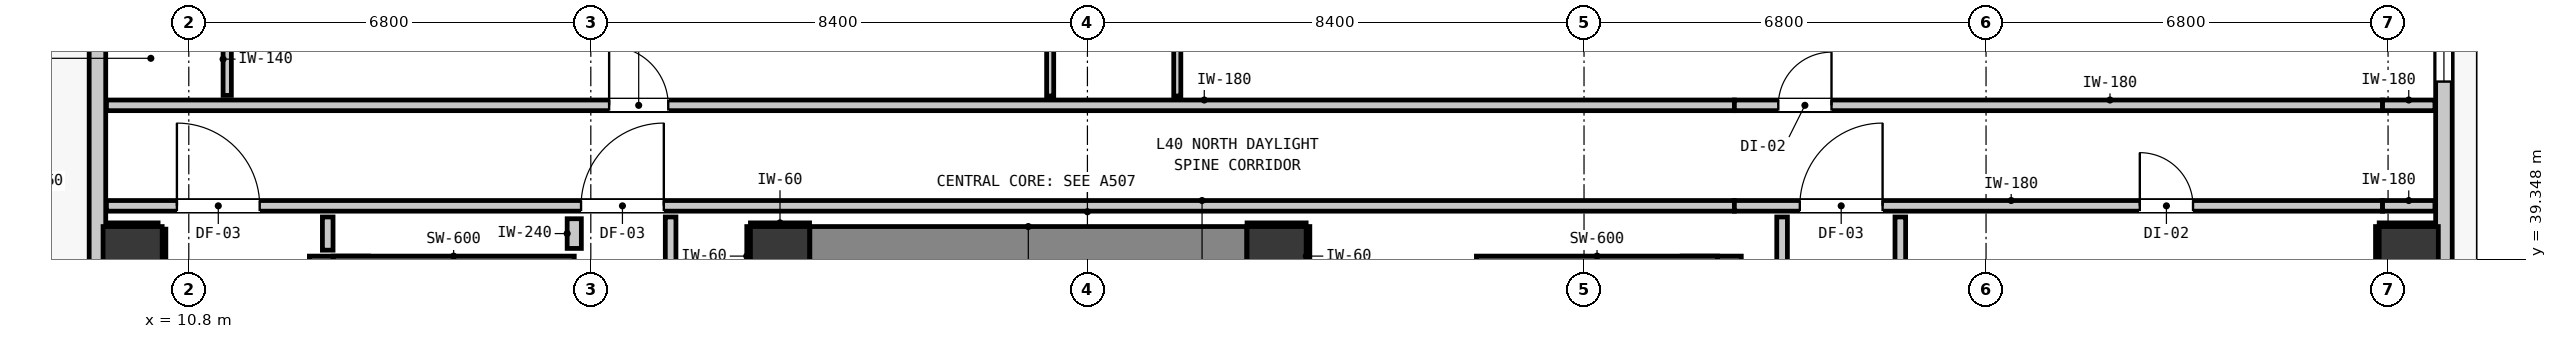
"""IFC4 building model, lengths in metres.
Left out: names, types, materials, properties, quantities, classifications, styles, units other than length and angle.
Written with IfcOpenShell. Run it as: python <this file> out.ifc"""

import sys

from ifc_helpers import new_model, si_unit, direction, frame, frame_2d, origin, origin_2d, place, context, subcontext, project, spatial, rectangle, extrude, element, fill, save


model = new_model("IFC4")
c1 = context("Model", 3, precision=1e-05, world=origin(), true_north=direction((0.0, 1.0)))
c2 = subcontext(c1, "Body", "Model", "MODEL_VIEW")
j1 = project(units=[si_unit("LENGTHUNIT", "METRE"), si_unit("PLANEANGLEUNIT", "RADIAN")], contexts=[c1])
p1 = place(None, origin())
s1 = spatial("IfcSite", under=j1, at=p1, CompositionType="ELEMENT")
p2 = place(p1, origin())
s2 = spatial("IfcBuilding", under=s1, at=p2, CompositionType="ELEMENT")
p3 = place(p2, frame((0.0, 0.0, 139.28)))
s3 = spatial("IfcBuildingStorey", under=s2, at=p3, CompositionType="ELEMENT", Elevation=139.28)
for number, where, z_axis, x_axis in (
    (1, (20.8, 39.4, 0.0), (0.0, 0.0, 1.0), (1.0, 0.0, 0.0)),
    (2, (29.2, 39.4, 0.0), (0.0, 0.0, 1.0), (1.0, 0.0, 0.0)),
):
    element("IfcColumn", number, at=place(p3, frame(where, z_axis=z_axis, x_axis=x_axis)), inside=s3, PredefinedType="COLUMN", context=c2, shape_type="SweptSolid", body=[
        extrude(rectangle(XDim=1.0, YDim=1.0, at=origin_2d()), origin(), (0.0, 0.0, 1.0), 3.32),
    ])
p4 = place(p3, frame((13.34, 31.205, 0.0), z_axis=(0.0, 0.0, 1.0), x_axis=(0.0, 1.0, 0.0)))
e3 = element("IfcWall", 3, at=p4, inside=s3, PredefinedType="SHEAR", context=c2, shape_type="SweptSolid", body=[
    extrude(rectangle(XDim=8.195, YDim=1.0, at=frame_2d((4.097, 0.0))), origin(), (0.0, 0.0, 1.0), 3.32),
])
p5 = place(p3, frame((13.24, 39.1, 0.0), z_axis=(0.0, 0.0, 1.0), x_axis=(1.0, 0.0, 0.0)))
e4 = element("IfcWall", 4, at=p5, inside=s3, PredefinedType="SHEAR", context=c2, shape_type="SweptSolid", body=[
    extrude(rectangle(XDim=4.08, YDim=0.6, at=frame_2d((2.04, 0.0))), origin(), (0.0, 0.0, 1.0), 3.32),
])
p6 = place(p3, frame((36.56, 31.205, 0.0), z_axis=(0.0, 0.0, 1.0), x_axis=(0.0, 1.0, 0.0)))
e5 = element("IfcWall", 5, at=p6, inside=s3, PredefinedType="SHEAR", context=c2, shape_type="SweptSolid", body=[
    extrude(rectangle(XDim=8.195, YDim=1.0, at=frame_2d((4.097, 0.0))), origin(), (0.0, 0.0, 1.0), 3.32),
])
p7 = place(p3, frame((32.58, 39.1, 0.0), z_axis=(0.0, 0.0, 1.0), x_axis=(1.0, 0.0, 0.0)))
e6 = element("IfcWall", 6, at=p7, inside=s3, PredefinedType="SHEAR", context=c2, shape_type="SweptSolid", body=[
    extrude(rectangle(XDim=4.08, YDim=0.6, at=frame_2d((2.04, 0.0))), origin(), (0.0, 0.0, 1.0), 3.32),
])
p8 = place(p3, frame((21.305, 39.4, 0.0), z_axis=(0.0, 0.0, 1.0), x_axis=(1.0, 0.0, 0.0)))
e7 = element("IfcWall", 7, at=p8, inside=s3, PredefinedType="SHEAR", context=c2, shape_type="SweptSolid", body=[
    extrude(rectangle(XDim=7.39, YDim=1.0, at=frame_2d((3.695, 0.0))), origin(), (0.0, 0.0, 1.0), 3.32),
])
for number, where, z_axis, x_axis in (
    (8, (9.85, 39.4, 0.0), (0.0, 0.0, 1.0), (1.0, 0.0, 0.0)),
    (9, (48.35, 39.4, 0.0), (0.0, 0.0, 1.0), (1.0, 0.0, 0.0)),
):
    element("IfcColumn", number, at=place(p3, frame(where, z_axis=z_axis, x_axis=x_axis)), inside=s3, PredefinedType="COLUMN", context=c2, shape_type="SweptSolid", body=[
        extrude(rectangle(XDim=1.0, YDim=1.0, at=origin_2d()), origin(), (0.0, 0.0, 1.0), 3.32),
    ])
p9 = place(p3, frame((9.255, 11.355, 0.0), z_axis=(0.0, 0.0, 1.0), x_axis=(0.0, 1.0, 0.0)))
e10 = element("IfcWall", 10, at=p9, inside=s3, PredefinedType="STANDARD", context=c2, shape_type="SweptSolid", body=[
    extrude(rectangle(XDim=32.29, YDim=0.28, at=frame_2d((16.145, 0.0))), origin(), (0.0, 0.0, 1.0), 3.08),
])
p10 = place(p9, frame((5.818, 0.0, 0.0)))
e11 = element("IfcOpeningElement", 11, at=p10, cuts=e10, PredefinedType="OPENING", context=c2, shape_type="SweptSolid", body=[
    extrude(rectangle(XDim=1.0, YDim=2.15, at=frame_2d((0.5, 1.075))), frame((0.0, 0.15, 0.0), z_axis=(0.0, -1.0, 0.0), x_axis=(1.0, 0.0, 0.0)), (0.0, 0.0, 1.0), 0.3),
])
p11 = place(p9, frame((0.619, 0.0, 0.85)))
e12 = element("IfcOpeningElement", 12, at=p11, cuts=e10, PredefinedType="OPENING", context=c2, shape_type="SweptSolid", body=[
    extrude(rectangle(XDim=0.9, YDim=1.5, at=frame_2d((0.45, 0.75))), frame((0.0, 0.15, 0.0), z_axis=(0.0, -1.0, 0.0), x_axis=(1.0, 0.0, 0.0)), (0.0, 0.0, 1.0), 0.3),
])
p12 = place(p3, frame((48.945, 43.645, 0.0), z_axis=(0.0, 0.0, 1.0), x_axis=(0.0, -1.0, 0.0)))
e13 = element("IfcWall", 13, at=p12, inside=s3, PredefinedType="STANDARD", context=c2, shape_type="SweptSolid", body=[
    extrude(rectangle(XDim=32.29, YDim=0.28, at=frame_2d((16.145, 0.0))), origin(), (0.0, 0.0, 1.0), 3.08),
])
p13 = place(p12, frame((5.467, 0.0, 0.0)))
e14 = element("IfcOpeningElement", 14, at=p13, cuts=e13, PredefinedType="OPENING", context=c2, shape_type="SweptSolid", body=[
    extrude(rectangle(XDim=1.0, YDim=2.15, at=frame_2d((0.5, 1.075))), frame((0.0, 0.15, 0.0), z_axis=(0.0, -1.0, 0.0), x_axis=(1.0, 0.0, 0.0)), (0.0, 0.0, 1.0), 0.3),
])
p14 = place(p12, frame((29.148, 0.0, 0.85)))
e15 = element("IfcOpeningElement", 15, at=p14, cuts=e13, PredefinedType="OPENING", context=c2, shape_type="SweptSolid", body=[
    extrude(rectangle(XDim=0.9, YDim=1.5, at=frame_2d((0.45, 0.75))), frame((0.0, 0.15, 0.0), z_axis=(0.0, -1.0, 0.0), x_axis=(1.0, 0.0, 0.0)), (0.0, 0.0, 1.0), 0.3),
])
p15 = place(p12, frame((0.393, 0.0, 0.85)))
e16 = element("IfcOpeningElement", 16, at=p15, cuts=e13, PredefinedType="OPENING", context=c2, shape_type="SweptSolid", body=[
    extrude(rectangle(XDim=0.9, YDim=1.5, at=frame_2d((0.45, 0.75))), frame((0.0, 0.15, 0.0), z_axis=(0.0, -1.0, 0.0), x_axis=(1.0, 0.0, 0.0)), (0.0, 0.0, 1.0), 0.3),
])
p16 = place(p12, frame((16.276, 0.0, 0.85)))
e17 = element("IfcOpeningElement", 17, at=p16, cuts=e13, PredefinedType="OPENING", context=c2, shape_type="SweptSolid", body=[
    extrude(rectangle(XDim=0.9, YDim=1.5, at=frame_2d((0.45, 0.75))), frame((0.0, 0.15, 0.0), z_axis=(0.0, -1.0, 0.0), x_axis=(1.0, 0.0, 0.0)), (0.0, 0.0, 1.0), 0.3),
])
p17 = place(p12, frame((10.645, 0.0, 0.85)))
e18 = element("IfcOpeningElement", 18, at=p17, cuts=e13, PredefinedType="OPENING", context=c2, shape_type="SweptSolid", body=[
    extrude(rectangle(XDim=0.9, YDim=1.5, at=frame_2d((0.45, 0.75))), frame((0.0, 0.15, 0.0), z_axis=(0.0, -1.0, 0.0), x_axis=(1.0, 0.0, 0.0)), (0.0, 0.0, 1.0), 0.3),
])
p18 = place(p3, frame((9.407, 40.25, 0.0), z_axis=(0.0, 0.0, 1.0), x_axis=(1.0, 0.0, 0.0)))
e19 = element("IfcWall", 19, at=p18, inside=s3, PredefinedType="PARTITIONING", context=c2, shape_type="SweptSolid", body=[
    extrude(rectangle(XDim=27.536, YDim=0.18, at=frame_2d((13.768, 0.0))), origin(), (0.0, 0.0, 1.0), 3.08),
])
p19 = place(p18, frame((8.028, 0.0, 0.0)))
e20 = element("IfcOpeningElement", 20, at=p19, cuts=e19, PredefinedType="OPENING", context=c2, shape_type="SweptSolid", body=[
    extrude(rectangle(XDim=1.4, YDim=2.15, at=frame_2d((0.7, 1.075))), frame((0.0, 0.1, 0.0), z_axis=(0.0, -1.0, 0.0), x_axis=(1.0, 0.0, 0.0)), (0.0, 0.0, 1.0), 0.2),
])
p20 = place(p18, frame((1.192, 0.0, 0.0)))
e21 = element("IfcOpeningElement", 21, at=p20, cuts=e19, PredefinedType="OPENING", context=c2, shape_type="SweptSolid", body=[
    extrude(rectangle(XDim=1.4, YDim=2.15, at=frame_2d((0.7, 1.075))), frame((0.0, 0.1, 0.0), z_axis=(0.0, -1.0, 0.0), x_axis=(1.0, 0.0, 0.0)), (0.0, 0.0, 1.0), 0.2),
])
p21 = place(p3, frame((36.943, 40.25, 0.0), z_axis=(0.0, 0.0, 1.0), x_axis=(1.0, 0.0, 0.0)))
e22 = element("IfcWall", 22, at=p21, inside=s3, PredefinedType="PARTITIONING", context=c2, shape_type="SweptSolid", body=[
    extrude(rectangle(XDim=10.964, YDim=0.18, at=frame_2d((5.482, 0.0))), origin(), (0.0, 0.0, 1.0), 2.565),
])
p22 = place(p21, frame((1.107, 0.0, 0.0)))
e23 = element("IfcOpeningElement", 23, at=p22, cuts=e22, PredefinedType="OPENING", context=c2, shape_type="SweptSolid", body=[
    extrude(rectangle(XDim=1.4, YDim=2.15, at=frame_2d((0.7, 1.075))), frame((0.0, 0.1, 0.0), z_axis=(0.0, -1.0, 0.0), x_axis=(1.0, 0.0, 0.0)), (0.0, 0.0, 1.0), 0.2),
])
p23 = place(p21, frame((6.858, 0.0, 0.0)))
e24 = element("IfcOpeningElement", 24, at=p23, cuts=e22, PredefinedType="OPENING", context=c2, shape_type="SweptSolid", body=[
    extrude(rectangle(XDim=0.9, YDim=2.1, at=frame_2d((0.45, 1.05))), frame((0.0, 0.1, 0.0), z_axis=(0.0, -1.0, 0.0), x_axis=(1.0, 0.0, 0.0)), (0.0, 0.0, 1.0), 0.2),
])
p24 = place(p3, frame((47.907, 40.25, 0.0), z_axis=(0.0, 0.0, 1.0), x_axis=(1.0, 0.0, 0.0)))
e25 = element("IfcWall", 25, at=p24, inside=s3, PredefinedType="PARTITIONING", context=c2, shape_type="SweptSolid", body=[
    extrude(rectangle(XDim=0.886, YDim=0.18, at=frame_2d((0.443, 0.0))), origin(), (0.0, 0.0, 1.0), 3.08),
])
p25 = place(p3, frame((9.407, 41.95, 0.0), z_axis=(0.0, 0.0, 1.0), x_axis=(1.0, 0.0, 0.0)))
e26 = element("IfcWall", 26, at=p25, inside=s3, PredefinedType="PARTITIONING", context=c2, shape_type="SweptSolid", body=[
    extrude(rectangle(XDim=27.536, YDim=0.18, at=frame_2d((13.768, 0.0))), origin(), (0.0, 0.0, 1.0), 3.08),
])
p26 = place(p25, frame((8.503, 0.0, 0.0)))
e27 = element("IfcOpeningElement", 27, at=p26, cuts=e26, PredefinedType="OPENING", context=c2, shape_type="SweptSolid", body=[
    extrude(rectangle(XDim=1.0, YDim=2.15, at=frame_2d((0.5, 1.075))), frame((0.0, 0.1, 0.0), z_axis=(0.0, -1.0, 0.0), x_axis=(1.0, 0.0, 0.0)), (0.0, 0.0, 1.0), 0.2),
])
p27 = place(p3, frame((36.943, 41.95, 0.0), z_axis=(0.0, 0.0, 1.0), x_axis=(1.0, 0.0, 0.0)))
e28 = element("IfcWall", 28, at=p27, inside=s3, PredefinedType="PARTITIONING", context=c2, shape_type="SweptSolid", body=[
    extrude(rectangle(XDim=10.964, YDim=0.18, at=frame_2d((5.482, 0.0))), origin(), (0.0, 0.0, 1.0), 2.565),
])
p28 = place(p27, frame((0.743, 0.0, 0.0)))
e29 = element("IfcOpeningElement", 29, at=p28, cuts=e28, PredefinedType="OPENING", context=c2, shape_type="SweptSolid", body=[
    extrude(rectangle(XDim=0.9, YDim=2.1, at=frame_2d((0.45, 1.05))), frame((0.0, 0.1, 0.0), z_axis=(0.0, -1.0, 0.0), x_axis=(1.0, 0.0, 0.0)), (0.0, 0.0, 1.0), 0.2),
])
p29 = place(p3, frame((47.907, 41.95, 0.0), z_axis=(0.0, 0.0, 1.0), x_axis=(1.0, 0.0, 0.0)))
e30 = element("IfcWall", 30, at=p29, inside=s3, PredefinedType="PARTITIONING", context=c2, shape_type="SweptSolid", body=[
    extrude(rectangle(XDim=0.886, YDim=0.18, at=frame_2d((0.443, 0.0))), origin(), (0.0, 0.0, 1.0), 3.08),
])
p30 = place(p3, frame((17.32, 39.53, 0.0), z_axis=(0.0, 0.0, 1.0), x_axis=(0.0, 1.0, 0.0)))
e31 = element("IfcWall", 31, at=p30, inside=s3, PredefinedType="PARTITIONING", context=c2, shape_type="SweptSolid", body=[
    extrude(rectangle(XDim=0.502, YDim=0.24, at=frame_2d((0.251, 0.0))), origin(), (0.0, 0.0, 1.0), 3.08),
])
p31 = place(p3, frame((13.15, 39.5, 0.0), z_axis=(0.0, 0.0, 1.0), x_axis=(0.0, 1.0, 0.0)))
e32 = element("IfcWall", 32, at=p31, inside=s3, PredefinedType="PARTITIONING", context=c2, shape_type="SweptSolid", body=[
    extrude(rectangle(XDim=0.562, YDim=0.18, at=frame_2d((0.281, 0.0))), origin(), (0.0, 0.0, 1.0), 2.315),
])
p32 = place(p3, frame((18.95, 39.058, 0.0), z_axis=(0.0, 0.0, 1.0), x_axis=(0.0, 1.0, 0.0)))
e33 = element("IfcWall", 33, at=p32, inside=s3, PredefinedType="PARTITIONING", context=c2, shape_type="SweptSolid", body=[
    extrude(rectangle(XDim=1.004, YDim=0.18, at=frame_2d((0.502, 0.0))), origin(), (0.0, 0.0, 1.0), 3.08),
])
p33 = place(p3, frame((37.75, 21.368, 0.0), z_axis=(0.0, 0.0, 1.0), x_axis=(0.0, 1.0, 0.0)))
e34 = element("IfcWall", 34, at=p33, inside=s3, PredefinedType="PARTITIONING", context=c2, shape_type="SweptSolid", body=[
    extrude(rectangle(XDim=18.694, YDim=0.18, at=frame_2d((9.347, 0.0))), origin(), (0.0, 0.0, 1.0), 3.08),
])
p34 = place(p3, frame((39.75, 34.168, 0.0), z_axis=(0.0, 0.0, 1.0), x_axis=(0.0, 1.0, 0.0)))
e35 = element("IfcWall", 35, at=p34, inside=s3, PredefinedType="PARTITIONING", context=c2, shape_type="SweptSolid", body=[
    extrude(rectangle(XDim=5.894, YDim=0.18, at=frame_2d((2.947, 0.0))), origin(), (0.0, 0.0, 1.0), 3.08),
])
p35 = place(p3, frame((11.45, 42.118, 0.0), z_axis=(0.0, 0.0, 1.0), x_axis=(0.0, 1.0, 0.0)))
e36 = element("IfcWall", 36, at=p35, inside=s3, PredefinedType="PARTITIONING", context=c2, shape_type="SweptSolid", body=[
    extrude(rectangle(XDim=2.808, YDim=0.14, at=frame_2d((1.404, 0.0))), origin(), (0.0, 0.0, 1.0), 2.565),
])
p36 = place(p35, frame((1.327, 0.0, 0.0)))
e37 = element("IfcOpeningElement", 37, at=p36, cuts=e36, PredefinedType="OPENING", context=c2, shape_type="SweptSolid", body=[
    extrude(rectangle(XDim=0.86, YDim=2.02, at=frame_2d((0.43, 1.01))), frame((0.0, 0.08, 0.0), z_axis=(0.0, -1.0, 0.0), x_axis=(1.0, 0.0, 0.0)), (0.0, 0.0, 1.0), 0.16),
])
p37 = place(p3, frame((25.37, 42.108, 0.0), z_axis=(0.0, 0.0, 1.0), x_axis=(0.0, 1.0, 0.0)))
e38 = element("IfcWall", 38, at=p37, inside=s3, PredefinedType="PARTITIONING", context=c2, shape_type="SweptSolid", body=[
    extrude(rectangle(XDim=3.685, YDim=0.12, at=frame_2d((1.843, 0.0))), origin(), (0.0, 0.0, 1.0), 3.08),
])
p38 = place(p37, frame((1.317, 0.0, 0.0)))
e39 = element("IfcOpeningElement", 39, at=p38, cuts=e38, PredefinedType="OPENING", context=c2, shape_type="SweptSolid", body=[
    extrude(rectangle(XDim=0.9, YDim=2.1, at=frame_2d((0.45, 1.05))), frame((0.0, 0.07, 0.0), z_axis=(0.0, -1.0, 0.0), x_axis=(1.0, 0.0, 0.0)), (0.0, 0.0, 1.0), 0.14),
])
p39 = place(p3, frame((27.52, 42.108, 0.0), z_axis=(0.0, 0.0, 1.0), x_axis=(0.0, 1.0, 0.0)))
e40 = element("IfcWall", 40, at=p39, inside=s3, PredefinedType="PARTITIONING", context=c2, shape_type="SweptSolid", body=[
    extrude(rectangle(XDim=3.685, YDim=0.12, at=frame_2d((1.843, 0.0))), origin(), (0.0, 0.0, 1.0), 3.08),
])
for number, where, z_axis, x_axis in (
    (41, (20.3, 39.932, 0.0), (0.0, 0.0, 1.0), (1.0, 0.0, 0.0)),
    (42, (20.268, 38.9, 0.0), (0.0, 0.0, 1.0), (0.0, 1.0, 0.0)),
    (43, (28.7, 39.932, 0.0), (0.0, 0.0, 1.0), (1.0, 0.0, 0.0)),
    (44, (29.732, 38.9, 0.0), (0.0, 0.0, 1.0), (0.0, 1.0, 0.0)),
):
    element("IfcWall", number, at=place(p3, frame(where, z_axis=z_axis, x_axis=x_axis)), inside=s3, PredefinedType="PARTITIONING", context=c2, shape_type="SweptSolid", body=[
        extrude(rectangle(XDim=1.0, YDim=0.06, at=frame_2d((0.5, 0.0))), origin(), (0.0, 0.0, 1.0), 1.45),
    ])
p40 = place(p3, frame((9.41, 39.932, 0.0), z_axis=(0.0, 0.0, 1.0), x_axis=(1.0, 0.0, 0.0)))
e45 = element("IfcWall", 45, at=p40, inside=s3, PredefinedType="PARTITIONING", context=c2, shape_type="SweptSolid", body=[
    extrude(rectangle(XDim=0.871, YDim=0.06, at=frame_2d((0.436, 0.0))), origin(), (0.0, 0.0, 1.0), 1.45),
])
p41 = place(p3, frame((10.382, 38.9, 0.0), z_axis=(0.0, 0.0, 1.0), x_axis=(0.0, 1.0, 0.0)))
e46 = element("IfcWall", 46, at=p41, inside=s3, PredefinedType="PARTITIONING", context=c2, shape_type="SweptSolid", body=[
    extrude(rectangle(XDim=0.956, YDim=0.06, at=frame_2d((0.478, 0.0))), origin(), (0.0, 0.0, 1.0), 1.45),
])
p42 = place(p3, frame((47.85, 39.932, 0.0), z_axis=(0.0, 0.0, 1.0), x_axis=(1.0, 0.0, 0.0)))
e47 = element("IfcWall", 47, at=p42, inside=s3, PredefinedType="PARTITIONING", context=c2, shape_type="SweptSolid", body=[
    extrude(rectangle(XDim=0.94, YDim=0.06, at=frame_2d((0.47, 0.0))), origin(), (0.0, 0.0, 1.0), 1.45),
])
p43 = place(p3, frame((47.818, 38.9, 0.0), z_axis=(0.0, 0.0, 1.0), x_axis=(0.0, 1.0, 0.0)))
e48 = element("IfcWall", 48, at=p43, inside=s3, PredefinedType="PARTITIONING", context=c2, shape_type="SweptSolid", body=[
    extrude(rectangle(XDim=1.0, YDim=0.06, at=frame_2d((0.5, 0.0))), origin(), (0.0, 0.0, 1.0), 1.45),
])
p44 = place(p15, origin())
e49 = element("IfcWindow", 49, at=p44, inside=s3, PartitioningType="SINGLE_PANEL", PredefinedType="WINDOW", context=c2, shape_type="SweptSolid", body=[
    extrude(rectangle(XDim=0.9, YDim=1.5, at=frame_2d((0.45, 0.75))), frame((0.0, 0.03, 0.0), z_axis=(0.0, -1.0, 0.0), x_axis=(1.0, 0.0, 0.0)), (0.0, 0.0, 1.0), 0.06),
])
fill(e16, e49)
p45 = place(p19, origin())
e50 = element("IfcDoor", 50, at=p45, inside=s3, OperationType="SINGLE_SWING_RIGHT", PredefinedType="DOOR", context=c2, shape_type="SweptSolid", body=[
    extrude(rectangle(XDim=1.4, YDim=2.15, at=frame_2d((0.7, 1.075))), frame((0.0, 0.025, 0.0), z_axis=(0.0, -1.0, 0.0), x_axis=(1.0, 0.0, 0.0)), (0.0, 0.0, 1.0), 0.05),
])
fill(e20, e50)
p46 = place(p20, origin())
e51 = element("IfcDoor", 51, at=p46, inside=s3, OperationType="SINGLE_SWING_LEFT", PredefinedType="DOOR", context=c2, shape_type="SweptSolid", body=[
    extrude(rectangle(XDim=1.4, YDim=2.15, at=frame_2d((0.7, 1.075))), frame((0.0, 0.025, 0.0), z_axis=(0.0, -1.0, 0.0), x_axis=(1.0, 0.0, 0.0)), (0.0, 0.0, 1.0), 0.05),
])
fill(e21, e51)
p47 = place(p22, origin())
e52 = element("IfcDoor", 52, at=p47, inside=s3, OperationType="SINGLE_SWING_RIGHT", PredefinedType="DOOR", context=c2, shape_type="SweptSolid", body=[
    extrude(rectangle(XDim=1.4, YDim=2.15, at=frame_2d((0.7, 1.075))), frame((0.0, 0.025, 0.0), z_axis=(0.0, -1.0, 0.0), x_axis=(1.0, 0.0, 0.0)), (0.0, 0.0, 1.0), 0.05),
])
fill(e23, e52)
p48 = place(p26, origin())
e53 = element("IfcDoor", 53, at=p48, inside=s3, OperationType="SINGLE_SWING_LEFT", PredefinedType="DOOR", context=c2, shape_type="SweptSolid", body=[
    extrude(rectangle(XDim=1.0, YDim=2.15, at=frame_2d((0.5, 1.075))), frame((0.0, 0.025, 0.0), z_axis=(0.0, -1.0, 0.0), x_axis=(1.0, 0.0, 0.0)), (0.0, 0.0, 1.0), 0.05),
])
fill(e27, e53)
p49 = place(p28, origin())
e54 = element("IfcDoor", 54, at=p49, inside=s3, OperationType="SINGLE_SWING_RIGHT", PredefinedType="DOOR", context=c2, shape_type="SweptSolid", body=[
    extrude(rectangle(XDim=0.9, YDim=2.1, at=frame_2d((0.45, 1.05))), frame((0.0, 0.025, 0.0), z_axis=(0.0, -1.0, 0.0), x_axis=(1.0, 0.0, 0.0)), (0.0, 0.0, 1.0), 0.05),
])
fill(e29, e54)
p50 = place(p23, origin())
e55 = element("IfcDoor", 55, at=p50, inside=s3, OperationType="SINGLE_SWING_LEFT", PredefinedType="DOOR", context=c2, shape_type="SweptSolid", body=[
    extrude(rectangle(XDim=0.9, YDim=2.1, at=frame_2d((0.45, 1.05))), frame((0.0, 0.025, 0.0), z_axis=(0.0, -1.0, 0.0), x_axis=(1.0, 0.0, 0.0)), (0.0, 0.0, 1.0), 0.05),
])
fill(e24, e55)
save(model, sys.argv[1])
